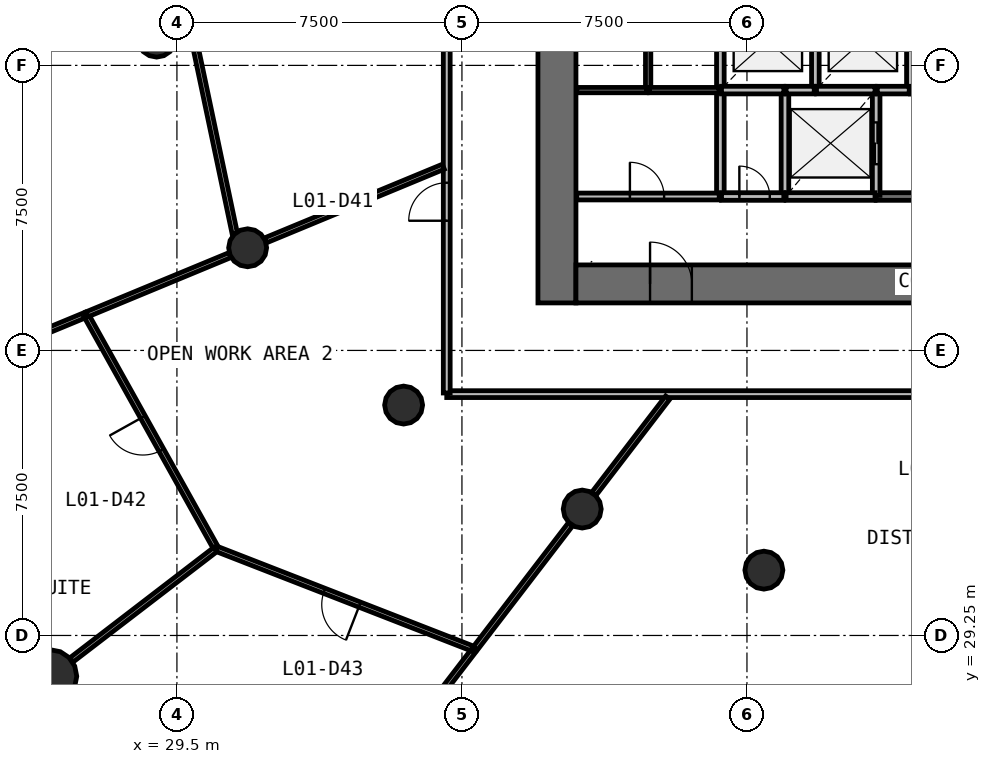
"""IFC4 building model, lengths in metres.
Left out: names, types, materials, properties, quantities, classifications, styles, units other than length and angle.
Written with IfcOpenShell. Run it as: python <this file> out.ifc"""

import sys

from ifc_helpers import new_model, si_unit, direction, frame, frame_2d, origin, origin_2d, place, context, subcontext, project, spatial, rectangle, circle, extrude, source, transform, mapped, element, fill, save


model = new_model("IFC4")
c1 = context("Model", 3, precision=1e-05, world=origin(), true_north=direction((0.0, 1.0)))
c2 = subcontext(c1, "Body", "Model", "MODEL_VIEW")
j1 = project(units=[si_unit("LENGTHUNIT", "METRE"), si_unit("PLANEANGLEUNIT", "RADIAN")], contexts=[c1])
p1 = place(None, origin())
s1 = spatial("IfcSite", under=j1, at=p1, CompositionType="ELEMENT")
p2 = place(p1, origin())
s2 = spatial("IfcBuilding", under=s1, at=p2, CompositionType="ELEMENT")
p3 = place(p2, frame((0.0, 0.0, 5.0)))
s3 = spatial("IfcBuildingStorey", under=s2, at=p3, CompositionType="ELEMENT", Elevation=5.0)
p4 = place(p3, frame((39.5, 58.0, 0.0), z_axis=(0.0, 0.0, 1.0), x_axis=(0.0, -1.0, 0.0)))
e1 = element("IfcWall", 1, at=p4, inside=s3, PredefinedType="SHEAR", context=c2, shape_type="SweptSolid", body=[
    extrude(rectangle(XDim=20.0, YDim=1.0, at=frame_2d((10.0, 0.0))), origin(), (0.0, 0.0, 1.0), 4.4),
])
p5 = place(p4, frame((9.1, 0.0, 0.0)))
e2 = element("IfcOpeningElement", 2, at=p5, cuts=e1, PredefinedType="OPENING", context=c2, shape_type="SweptSolid", body=[
    extrude(rectangle(XDim=1.8, YDim=2.1, at=frame_2d((0.9, 1.05))), frame((0.0, 0.51, 0.0), z_axis=(0.0, -1.0, 0.0), x_axis=(1.0, 0.0, 0.0)), (0.0, 0.0, 1.0), 1.02),
])
p6 = place(p3, frame((40.0, 38.5, 0.0), z_axis=(0.0, 0.0, 1.0), x_axis=(1.0, 0.0, 0.0)))
e3 = element("IfcWall", 3, at=p6, inside=s3, PredefinedType="SHEAR", context=c2, shape_type="SweptSolid", body=[
    extrude(rectangle(XDim=24.0, YDim=1.0, at=frame_2d((12.0, 0.0))), origin(), (0.0, 0.0, 1.0), 4.4),
])
p7 = place(p6, frame((21.45, 0.0, 0.0)))
e4 = element("IfcOpeningElement", 4, at=p7, cuts=e3, PredefinedType="OPENING", context=c2, shape_type="SweptSolid", body=[
    extrude(rectangle(XDim=1.1, YDim=2.1, at=frame_2d((0.55, 1.05))), frame((0.0, 0.51, 0.0), z_axis=(0.0, -1.0, 0.0), x_axis=(1.0, 0.0, 0.0)), (0.0, 0.0, 1.0), 1.02),
])
p8 = place(p6, frame((1.95, 0.0, 0.0)))
e5 = element("IfcOpeningElement", 5, at=p8, cuts=e3, PredefinedType="OPENING", context=c2, shape_type="SweptSolid", body=[
    extrude(rectangle(XDim=1.1, YDim=2.1, at=frame_2d((0.55, 1.05))), frame((0.0, 0.51, 0.0), z_axis=(0.0, -1.0, 0.0), x_axis=(1.0, 0.0, 0.0)), (0.0, 0.0, 1.0), 1.02),
])
m1 = source(origin(), c2, "Body", "SweptSolid", [
    extrude(circle(Radius=0.7, at=origin_2d()), origin(), (0.0, 0.0, 1.0), 4.4),
])
p9 = place(p3, frame((26.164, 28.176, 0.0), z_axis=(0.0, 0.0, 1.0), x_axis=(1.0, 0.0, 0.0)))
e6 = element("IfcColumn", 6, at=p9, inside=s3, PredefinedType="COLUMN", context=c2, shape_type="MappedRepresentation", body=[
    mapped(m1, transform((0.0, 0.0, 0.0), scale=1.0)),
])
m2 = source(origin(), c2, "Body", "SweptSolid", [
    extrude(circle(Radius=0.5, at=origin_2d()), origin(), (0.0, 0.0, 1.0), 4.4),
])
for number, where, z_axis, x_axis in (
    (7, (28.966, 44.968, 0.0), (0.0, 0.0, 1.0), (1.0, 0.0, 0.0)),
    (8, (31.361, 39.451, 0.0), (0.0, 0.0, 1.0), (1.0, 0.0, 0.0)),
    (9, (35.465, 35.312, 0.0), (0.0, 0.0, 1.0), (1.0, 0.0, 0.0)),
    (10, (40.165, 32.576, 0.0), (0.0, 0.0, 1.0), (1.0, 0.0, 0.0)),
    (11, (44.945, 30.969, 0.0), (0.0, 0.0, 1.0), (1.0, 0.0, 0.0)),
):
    element("IfcColumn", number, at=place(p3, frame(where, z_axis=z_axis, x_axis=x_axis)), inside=s3, PredefinedType="COLUMN", context=c2, shape_type="MappedRepresentation", body=[
        mapped(m2, transform((0.0, 0.0, 0.0), scale=1.0)),
    ])
p10 = place(p3, frame((47.9, 40.8, 0.0), z_axis=(0.0, 0.0, 1.0), x_axis=(1.0, 0.0, 0.0)))
e12 = element("IfcWall", 12, at=p10, inside=s3, PredefinedType="SOLIDWALL", context=c2, shape_type="SweptSolid", body=[
    extrude(rectangle(XDim=5.67, YDim=0.2, at=frame_2d((2.835, 0.0))), origin(), (0.0, 0.0, 1.0), 4.05),
])
p11 = place(p10, frame((2.95, 0.0, 0.0)))
e13 = element("IfcOpeningElement", 13, at=p11, cuts=e12, PredefinedType="OPENING", context=c2, shape_type="SweptSolid", body=[
    extrude(rectangle(XDim=1.1, YDim=2.1, at=frame_2d((0.55, 1.05))), frame((0.0, 0.11, 0.0), z_axis=(0.0, -1.0, 0.0), x_axis=(1.0, 0.0, 0.0)), (0.0, 0.0, 1.0), 0.22),
])
for number, where, z_axis, x_axis in (
    (14, (43.8, 43.6, 0.0), (0.0, 0.0, 1.0), (0.0, -1.0, 0.0)),
    (15, (45.5, 43.6, 0.0), (0.0, 0.0, 1.0), (0.0, -1.0, 0.0)),
):
    element("IfcWall", number, at=place(p3, frame(where, z_axis=z_axis, x_axis=x_axis)), inside=s3, PredefinedType="SOLIDWALL", context=c2, shape_type="SweptSolid", body=[
        extrude(rectangle(XDim=2.8, YDim=0.2, at=frame_2d((1.4, 0.0))), origin(), (0.0, 0.0, 1.0), 4.05),
    ])
p12 = place(p3, frame((47.9, 40.83, 0.0), z_axis=(0.0, 0.0, 1.0), x_axis=(0.0, 1.0, 0.0)))
e16 = element("IfcWall", 16, at=p12, inside=s3, PredefinedType="SOLIDWALL", context=c2, shape_type="SweptSolid", body=[
    extrude(rectangle(XDim=2.77, YDim=0.2, at=frame_2d((1.385, 0.0))), origin(), (0.0, 0.0, 1.0), 4.05),
])
p13 = place(p12, frame((0.82, 0.0, 0.0)))
e17 = element("IfcOpeningElement", 17, at=p13, cuts=e16, PredefinedType="OPENING", context=c2, shape_type="SweptSolid", body=[
    extrude(rectangle(XDim=1.1, YDim=2.1, at=frame_2d((0.55, 1.05))), frame((0.0, 0.11, 0.0), z_axis=(0.0, -1.0, 0.0), x_axis=(1.0, 0.0, 0.0)), (0.0, 0.0, 1.0), 0.22),
])
p14 = place(p3, frame((45.53, 40.8, 0.0), z_axis=(0.0, 0.0, 1.0), x_axis=(1.0, 0.0, 0.0)))
e18 = element("IfcWall", 18, at=p14, inside=s3, PredefinedType="SOLIDWALL", context=c2, shape_type="SweptSolid", body=[
    extrude(rectangle(XDim=2.34, YDim=0.2, at=frame_2d((1.17, 0.0))), origin(), (0.0, 0.0, 1.0), 4.05),
])
p15 = place(p3, frame((43.8, 45.99, 0.0), z_axis=(0.0, 0.0, 1.0), x_axis=(0.0, -1.0, 0.0)))
e19 = element("IfcWall", 19, at=p15, inside=s3, PredefinedType="SOLIDWALL", context=c2, shape_type="SweptSolid", body=[
    extrude(rectangle(XDim=2.36, YDim=0.2, at=frame_2d((1.18, 0.0))), origin(), (0.0, 0.0, 1.0), 4.05),
])
p16 = place(p3, frame((46.3, 43.6, 0.0), z_axis=(0.0, 0.0, 1.0), x_axis=(0.0, 1.0, 0.0)))
e20 = element("IfcWall", 20, at=p16, inside=s3, PredefinedType="SOLIDWALL", context=c2, shape_type="SweptSolid", body=[
    extrude(rectangle(XDim=2.39, YDim=0.2, at=frame_2d((1.195, 0.0))), origin(), (0.0, 0.0, 1.0), 4.05),
])
p17 = place(p3, frame((48.8, 43.63, 0.0), z_axis=(0.0, 0.0, 1.0), x_axis=(0.0, 1.0, 0.0)))
e21 = element("IfcWall", 21, at=p17, inside=s3, PredefinedType="SOLIDWALL", context=c2, shape_type="SweptSolid", body=[
    extrude(rectangle(XDim=2.36, YDim=0.2, at=frame_2d((1.18, 0.0))), origin(), (0.0, 0.0, 1.0), 4.05),
])
p18 = place(p3, frame((43.83, 43.6, 0.0), z_axis=(0.0, 0.0, 1.0), x_axis=(1.0, 0.0, 0.0)))
e22 = element("IfcWall", 22, at=p18, inside=s3, PredefinedType="SOLIDWALL", context=c2, shape_type="SweptSolid", body=[
    extrude(rectangle(XDim=1.64, YDim=0.2, at=frame_2d((0.82, 0.0))), origin(), (0.0, 0.0, 1.0), 4.05),
])
p19 = place(p3, frame((43.83, 40.8, 0.0), z_axis=(0.0, 0.0, 1.0), x_axis=(1.0, 0.0, 0.0)))
e23 = element("IfcWall", 23, at=p19, inside=s3, PredefinedType="SOLIDWALL", context=c2, shape_type="SweptSolid", body=[
    extrude(rectangle(XDim=1.64, YDim=0.2, at=frame_2d((0.82, 0.0))), origin(), (0.0, 0.0, 1.0), 4.05),
])
p20 = place(p19, frame((0.47, 0.0, 0.0)))
e24 = element("IfcOpeningElement", 24, at=p20, cuts=e23, PredefinedType="OPENING", context=c2, shape_type="SweptSolid", body=[
    extrude(rectangle(XDim=0.8, YDim=2.1, at=frame_2d((0.4, 1.05))), frame((0.0, 0.11, 0.0), z_axis=(0.0, -1.0, 0.0), x_axis=(1.0, 0.0, 0.0)), (0.0, 0.0, 1.0), 0.22),
])
p21 = place(p3, frame((46.33, 43.6, 0.0), z_axis=(0.0, 0.0, 1.0), x_axis=(1.0, 0.0, 0.0)))
e25 = element("IfcWall", 25, at=p21, inside=s3, PredefinedType="SOLIDWALL", context=c2, shape_type="SweptSolid", body=[
    extrude(rectangle(XDim=1.54, YDim=0.2, at=frame_2d((0.77, 0.0))), origin(), (0.0, 0.0, 1.0), 4.05),
])
p22 = place(p3, frame((47.93, 43.6, 0.0), z_axis=(0.0, 0.0, 1.0), x_axis=(1.0, 0.0, 0.0)))
e26 = element("IfcWall", 26, at=p22, inside=s3, PredefinedType="SOLIDWALL", context=c2, shape_type="SweptSolid", body=[
    extrude(rectangle(XDim=0.84, YDim=0.2, at=frame_2d((0.42, 0.0))), origin(), (0.0, 0.0, 1.0), 4.05),
])
p23 = place(p3, frame((45.53, 43.6, 0.0), z_axis=(0.0, 0.0, 1.0), x_axis=(1.0, 0.0, 0.0)))
e27 = element("IfcWall", 27, at=p23, inside=s3, PredefinedType="SOLIDWALL", context=c2, shape_type="SweptSolid", body=[
    extrude(rectangle(XDim=0.74, YDim=0.2, at=frame_2d((0.37, 0.0))), origin(), (0.0, 0.0, 1.0), 4.05),
])
p24 = place(p3, frame((67.4, 35.6, 0.0), z_axis=(0.0, 0.0, 1.0), x_axis=(-1.0, 0.0, 0.0)))
e28 = element("IfcWall", 28, at=p24, inside=s3, PredefinedType="PARTITIONING", context=c2, shape_type="SweptSolid", body=[
    extrude(rectangle(XDim=30.8, YDim=0.18, at=frame_2d((15.4, 0.0))), origin(), (0.0, 0.0, 1.0), 3.25),
])
p25 = place(p24, frame((17.35, 0.0, 0.0)))
e29 = element("IfcOpeningElement", 29, at=p25, cuts=e28, PredefinedType="OPENING", context=c2, shape_type="SweptSolid", body=[
    extrude(rectangle(XDim=1.0, YDim=2.1, at=frame_2d((0.5, 1.05))), frame((0.0, 0.1, 0.0), z_axis=(0.0, -1.0, 0.0), x_axis=(1.0, 0.0, 0.0)), (0.0, 0.0, 1.0), 0.2),
])
p26 = place(p24, frame((14.95, 0.0, 0.0)))
e30 = element("IfcOpeningElement", 30, at=p26, cuts=e28, PredefinedType="OPENING", context=c2, shape_type="SweptSolid", body=[
    extrude(rectangle(XDim=1.0, YDim=2.1, at=frame_2d((0.5, 1.05))), frame((0.0, 0.1, 0.0), z_axis=(0.0, -1.0, 0.0), x_axis=(1.0, 0.0, 0.0)), (0.0, 0.0, 1.0), 0.2),
])
p27 = place(p24, frame((8.95, 0.0, 0.0)))
e31 = element("IfcOpeningElement", 31, at=p27, cuts=e28, PredefinedType="OPENING", context=c2, shape_type="SweptSolid", body=[
    extrude(rectangle(XDim=1.0, YDim=2.1, at=frame_2d((0.5, 1.05))), frame((0.0, 0.1, 0.0), z_axis=(0.0, -1.0, 0.0), x_axis=(1.0, 0.0, 0.0)), (0.0, 0.0, 1.0), 0.2),
])
p28 = place(p3, frame((36.6, 35.63, 0.0), z_axis=(0.0, 0.0, 1.0), x_axis=(0.0, 1.0, 0.0)))
e32 = element("IfcWall", 32, at=p28, inside=s3, PredefinedType="PARTITIONING", context=c2, shape_type="SweptSolid", body=[
    extrude(rectangle(XDim=23.583, YDim=0.18, at=frame_2d((11.791, 0.0))), origin(), (0.0, 0.0, 1.0), 3.25),
])
p29 = place(p28, frame((19.133, 0.0, 0.0)))
e33 = element("IfcOpeningElement", 33, at=p29, cuts=e32, PredefinedType="OPENING", context=c2, shape_type="SweptSolid", body=[
    extrude(rectangle(XDim=1.0, YDim=2.1, at=frame_2d((0.5, 1.05))), frame((0.0, 0.1, 0.0), z_axis=(0.0, -1.0, 0.0), x_axis=(1.0, 0.0, 0.0)), (0.0, 0.0, 1.0), 0.2),
])
p30 = place(p28, frame((11.333, 0.0, 0.0)))
e34 = element("IfcOpeningElement", 34, at=p30, cuts=e32, PredefinedType="OPENING", context=c2, shape_type="SweptSolid", body=[
    extrude(rectangle(XDim=1.0, YDim=2.1, at=frame_2d((0.5, 1.05))), frame((0.0, 0.1, 0.0), z_axis=(0.0, -1.0, 0.0), x_axis=(1.0, 0.0, 0.0)), (0.0, 0.0, 1.0), 0.2),
])
p31 = place(p28, frame((4.532, 0.0, 0.0)))
e35 = element("IfcOpeningElement", 35, at=p31, cuts=e32, PredefinedType="OPENING", context=c2, shape_type="SweptSolid", body=[
    extrude(rectangle(XDim=1.0, YDim=2.1, at=frame_2d((0.5, 1.05))), frame((0.0, 0.1, 0.0), z_axis=(0.0, -1.0, 0.0), x_axis=(1.0, 0.0, 0.0)), (0.0, 0.0, 1.0), 0.2),
])
p32 = place(p3, frame((40.02, 40.8, 0.0), z_axis=(0.0, 0.0, 1.0), x_axis=(1.0, 0.0, 0.0)))
e36 = element("IfcWall", 36, at=p32, inside=s3, PredefinedType="PARTITIONING", context=c2, shape_type="SweptSolid", body=[
    extrude(rectangle(XDim=3.75, YDim=0.18, at=frame_2d((1.875, 0.0))), origin(), (0.0, 0.0, 1.0), 4.05),
])
p33 = place(p32, frame((1.4, 0.0, 0.0)))
e37 = element("IfcOpeningElement", 37, at=p33, cuts=e36, PredefinedType="OPENING", context=c2, shape_type="SweptSolid", body=[
    extrude(rectangle(XDim=0.9, YDim=2.1, at=frame_2d((0.45, 1.05))), frame((0.0, 0.1, 0.0), z_axis=(0.0, -1.0, 0.0), x_axis=(1.0, 0.0, 0.0)), (0.0, 0.0, 1.0), 0.2),
])
p34 = place(p3, frame((49.595, 29.733, 0.0), z_axis=(0.0, 0.0, 1.0), x_axis=(-0.130521426482, -0.991445488783, 0.0)))
e38 = element("IfcWall", 38, at=p34, inside=s3, PredefinedType="PARTITIONING", context=c2, shape_type="SweptSolid", body=[
    extrude(rectangle(XDim=8.872, YDim=0.14, at=frame_2d((4.436, 0.0))), origin(), (0.0, 0.0, 1.0), 3.25),
])
p35 = place(p3, frame((37.332, 28.885, 0.0), z_axis=(0.0, 0.0, 1.0), x_axis=(-0.93183870761, 0.362872736645, 0.0)))
e39 = element("IfcWall", 39, at=p35, inside=s3, PredefinedType="PARTITIONING", context=c2, shape_type="SweptSolid", body=[
    extrude(rectangle(XDim=7.292, YDim=0.14, at=frame_2d((3.646, 0.0))), origin(), (0.0, 0.0, 1.0), 3.25),
])
p36 = place(p35, frame((3.242, 0.0, 0.0)))
e40 = element("IfcOpeningElement", 40, at=p36, cuts=e39, PredefinedType="OPENING", context=c2, shape_type="SweptSolid", body=[
    extrude(rectangle(XDim=1.0, YDim=2.1, at=frame_2d((0.5, 1.05))), frame((0.0, 0.08, 0.0), z_axis=(0.0, -1.0, 0.0), x_axis=(1.0, 0.0, 0.0)), (0.0, 0.0, 1.0), 0.16),
])
p37 = place(p3, frame((27.105, 37.688, 0.0), z_axis=(0.0, 0.0, 1.0), x_axis=(-0.923884350367, -0.382671800824, 0.0)))
e41 = element("IfcWall", 41, at=p37, inside=s3, PredefinedType="PARTITIONING", context=c2, shape_type="SweptSolid", body=[
    extrude(rectangle(XDim=7.255, YDim=0.14, at=frame_2d((3.627, 0.0))), origin(), (0.0, 0.0, 1.0), 3.25),
])
p38 = place(p3, frame((30.522, 31.557, 0.0), z_axis=(0.0, 0.0, 1.0), x_axis=(-0.486864372852, 0.87347757982, 0.0)))
e42 = element("IfcWall", 42, at=p38, inside=s3, PredefinedType="PARTITIONING", context=c2, shape_type="SweptSolid", body=[
    extrude(rectangle(XDim=6.989, YDim=0.14, at=frame_2d((3.495, 0.0))), origin(), (0.0, 0.0, 1.0), 3.25),
])
p39 = place(p38, frame((2.939, 0.0, 0.0)))
e43 = element("IfcOpeningElement", 43, at=p39, cuts=e42, PredefinedType="OPENING", context=c2, shape_type="SweptSolid", body=[
    extrude(rectangle(XDim=1.0, YDim=2.1, at=frame_2d((0.5, 1.05))), frame((0.0, 0.08, 0.0), z_axis=(0.0, -1.0, 0.0), x_axis=(1.0, 0.0, 0.0)), (0.0, 0.0, 1.0), 0.16),
])
p40 = place(p3, frame((37.288, 28.827, 0.0), z_axis=(0.0, 0.0, 1.0), x_axis=(-0.608754531121, -0.793358633179, 0.0)))
e44 = element("IfcWall", 44, at=p40, inside=s3, PredefinedType="PARTITIONING", context=c2, shape_type="SweptSolid", body=[
    extrude(rectangle(XDim=5.506, YDim=0.14, at=frame_2d((2.753, 0.0))), origin(), (0.0, 0.0, 1.0), 3.25),
])
p41 = place(p3, frame((29.913, 45.092, 0.0), z_axis=(0.0, 0.0, 1.0), x_axis=(0.206049339712, -0.97854160341, 0.0)))
e45 = element("IfcWall", 45, at=p41, inside=s3, PredefinedType="PARTITIONING", context=c2, shape_type="SweptSolid", body=[
    extrude(rectangle(XDim=5.383, YDim=0.14, at=frame_2d((2.691, 0.0))), origin(), (0.0, 0.0, 1.0), 3.25),
])
p42 = place(p3, frame((36.51, 41.584, 0.0), z_axis=(0.0, 0.0, 1.0), x_axis=(-0.923890025086, -0.382658100067, 0.0)))
e46 = element("IfcWall", 46, at=p42, inside=s3, PredefinedType="PARTITIONING", context=c2, shape_type="SweptSolid", body=[
    extrude(rectangle(XDim=5.068, YDim=0.14, at=frame_2d((2.534, 0.0))), origin(), (0.0, 0.0, 1.0), 3.25),
])
p43 = place(p3, frame((30.513, 31.513, 0.0), z_axis=(0.0, 0.0, 1.0), x_axis=(-0.793352949366, -0.608761938472, 0.0)))
e47 = element("IfcWall", 47, at=p43, inside=s3, PredefinedType="PARTITIONING", context=c2, shape_type="SweptSolid", body=[
    extrude(rectangle(XDim=4.777, YDim=0.14, at=frame_2d((2.389, 0.0))), origin(), (0.0, 0.0, 1.0), 3.25),
])
p44 = place(p3, frame((39.858, 32.176, 0.0), z_axis=(0.0, 0.0, 1.0), x_axis=(-0.608764995469, -0.793350603637, 0.0)))
e48 = element("IfcWall", 48, at=p44, inside=s3, PredefinedType="PARTITIONING", context=c2, shape_type="SweptSolid", body=[
    extrude(rectangle(XDim=4.119, YDim=0.14, at=frame_2d((2.059, 0.0))), origin(), (0.0, 0.0, 1.0), 3.25),
])
p45 = place(p3, frame((30.894, 39.258, 0.0), z_axis=(0.0, 0.0, 1.0), x_axis=(-0.923875045436, -0.382694264943, 0.0)))
e49 = element("IfcWall", 49, at=p45, inside=s3, PredefinedType="PARTITIONING", context=c2, shape_type="SweptSolid", body=[
    extrude(rectangle(XDim=4.071, YDim=0.14, at=frame_2d((2.036, 0.0))), origin(), (0.0, 0.0, 1.0), 3.25),
])
p46 = place(p3, frame((42.416, 35.51, 0.0), z_axis=(0.0, 0.0, 1.0), x_axis=(-0.60874605662, -0.793365135703, 0.0)))
e50 = element("IfcWall", 50, at=p46, inside=s3, PredefinedType="PARTITIONING", context=c2, shape_type="SweptSolid", body=[
    extrude(rectangle(XDim=3.194, YDim=0.14, at=frame_2d((1.597, 0.0))), origin(), (0.0, 0.0, 1.0), 3.25),
])
p47 = place(p3, frame((41.9, 43.6, 0.0), z_axis=(0.0, 0.0, 1.0), x_axis=(0.0, 1.0, 0.0)))
e51 = element("IfcWall", 51, at=p47, inside=s3, PredefinedType="PARTITIONING", context=c2, shape_type="SweptSolid", body=[
    extrude(rectangle(XDim=2.39, YDim=0.14, at=frame_2d((1.195, 0.0))), origin(), (0.0, 0.0, 1.0), 3.25),
])
p48 = place(p3, frame((43.77, 43.6, 0.0), z_axis=(0.0, 0.0, 1.0), x_axis=(-1.0, 0.0, 0.0)))
e52 = element("IfcWall", 52, at=p48, inside=s3, PredefinedType="PARTITIONING", context=c2, shape_type="SweptSolid", body=[
    extrude(rectangle(XDim=1.84, YDim=0.14, at=frame_2d((0.92, 0.0))), origin(), (0.0, 0.0, 1.0), 3.25),
])
p49 = place(p3, frame((41.87, 43.6, 0.0), z_axis=(0.0, 0.0, 1.0), x_axis=(-1.0, 0.0, 0.0)))
e53 = element("IfcWall", 53, at=p49, inside=s3, PredefinedType="PARTITIONING", context=c2, shape_type="SweptSolid", body=[
    extrude(rectangle(XDim=1.85, YDim=0.14, at=frame_2d((0.925, 0.0))), origin(), (0.0, 0.0, 1.0), 3.25),
])
m3 = source(origin(), c2, "Body", "SweptSolid", [
    extrude(rectangle(XDim=1.1, YDim=2.1, at=frame_2d((0.55, 1.05))), frame((0.0, 0.025, 0.0), z_axis=(0.0, -1.0, 0.0), x_axis=(1.0, 0.0, 0.0)), (0.0, 0.0, 1.0), 0.05),
])
p50 = place(p13, origin())
e54 = element("IfcDoor", 54, at=p50, inside=s3, OperationType="DOUBLE_DOOR_SLIDING", PredefinedType="USERDEFINED", context=c2, shape_type="MappedRepresentation", body=[
    mapped(m3, transform((0.0, 0.0, 0.0), scale=1.0)),
])
fill(e17, e54)
m4 = source(origin(), c2, "Body", "SweptSolid", [
    extrude(rectangle(XDim=0.8, YDim=2.1, at=frame_2d((0.4, 1.05))), frame((0.0, 0.025, 0.0), z_axis=(0.0, -1.0, 0.0), x_axis=(1.0, 0.0, 0.0)), (0.0, 0.0, 1.0), 0.05),
])
p51 = place(p20, origin())
e55 = element("IfcDoor", 55, at=p51, inside=s3, OperationType="SINGLE_SWING_LEFT", PredefinedType="DOOR", context=c2, shape_type="MappedRepresentation", body=[
    mapped(m4, transform((0.0, 0.0, 0.0), scale=1.0)),
])
fill(e24, e55)
m5 = source(origin(), c2, "Body", "SweptSolid", [
    extrude(rectangle(XDim=1.1, YDim=2.1, at=frame_2d((0.55, 1.05))), frame((0.0, 0.025, 0.0), z_axis=(0.0, -1.0, 0.0), x_axis=(1.0, 0.0, 0.0)), (0.0, 0.0, 1.0), 0.05),
])
p52 = place(p8, origin())
e56 = element("IfcDoor", 56, at=p52, inside=s3, OperationType="SINGLE_SWING_LEFT", PredefinedType="DOOR", context=c2, shape_type="MappedRepresentation", body=[
    mapped(m5, transform((0.0, 0.0, 0.0), scale=1.0)),
])
fill(e5, e56)
m6 = source(origin(), c2, "Body", "SweptSolid", [
    extrude(rectangle(XDim=1.0, YDim=2.1, at=frame_2d((0.5, 1.05))), frame((0.0, 0.025, 0.0), z_axis=(0.0, -1.0, 0.0), x_axis=(1.0, 0.0, 0.0)), (0.0, 0.0, 1.0), 0.05),
])
p53 = place(p31, origin())
e57 = element("IfcDoor", 57, at=p53, inside=s3, OperationType="SINGLE_SWING_LEFT", PredefinedType="DOOR", context=c2, shape_type="MappedRepresentation", body=[
    mapped(m6, transform((0.0, 0.0, 0.0), scale=1.0)),
])
fill(e35, e57)
p54 = place(p39, origin())
e58 = element("IfcDoor", 58, at=p54, inside=s3, OperationType="SINGLE_SWING_RIGHT", PredefinedType="DOOR", context=c2, shape_type="MappedRepresentation", body=[
    mapped(m6, transform((0.0, 0.0, 0.0), scale=1.0)),
])
fill(e43, e58)
p55 = place(p36, origin())
e59 = element("IfcDoor", 59, at=p55, inside=s3, OperationType="SINGLE_SWING_LEFT", PredefinedType="DOOR", context=c2, shape_type="MappedRepresentation", body=[
    mapped(m6, transform((0.0, 0.0, 0.0), scale=1.0)),
])
fill(e40, e59)
m7 = source(origin(), c2, "Body", "SweptSolid", [
    extrude(rectangle(XDim=0.9, YDim=2.1, at=frame_2d((0.45, 1.05))), frame((0.0, 0.025, 0.0), z_axis=(0.0, -1.0, 0.0), x_axis=(1.0, 0.0, 0.0)), (0.0, 0.0, 1.0), 0.05),
])
p56 = place(p33, origin())
e60 = element("IfcDoor", 60, at=p56, inside=s3, OperationType="SINGLE_SWING_LEFT", PredefinedType="DOOR", context=c2, shape_type="MappedRepresentation", body=[
    mapped(m7, transform((0.0, 0.0, 0.0), scale=1.0)),
])
fill(e37, e60)
save(model, sys.argv[1])
